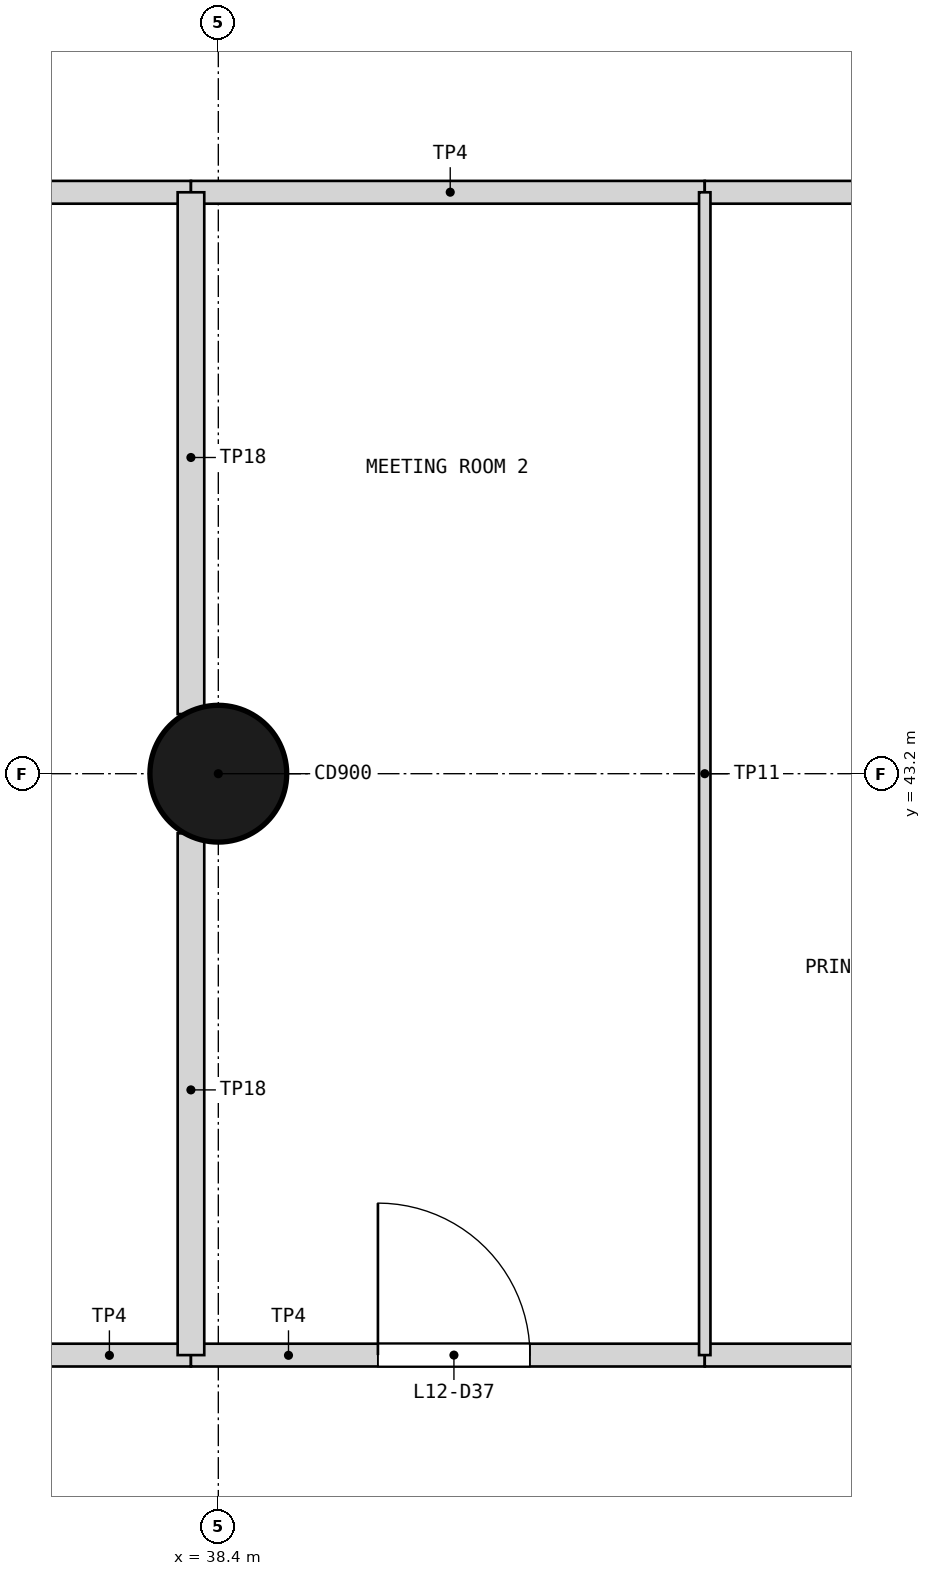
"""IFC4 building model, lengths in metres.
Left out: names, types, materials, properties, quantities, classifications, styles, units other than length and angle.
Written with IfcOpenShell. Run it as: python <this file> out.ifc"""

import sys

from ifc_helpers import new_model, si_unit, direction, frame, frame_2d, origin, origin_2d, place, context, subcontext, project, spatial, rectangle, circle, extrude, element, fill, save


model = new_model("IFC4")
c1 = context("Model", 3, precision=1e-05, world=origin(), true_north=direction((0.0, 1.0)))
c2 = subcontext(c1, "Body", "Model", "MODEL_VIEW")
j1 = project(units=[si_unit("LENGTHUNIT", "METRE"), si_unit("PLANEANGLEUNIT", "RADIAN")], contexts=[c1])
p1 = place(None, origin())
s1 = spatial("IfcSite", under=j1, at=p1, CompositionType="ELEMENT")
p2 = place(p1, origin())
s2 = spatial("IfcBuilding", under=s1, at=p2, CompositionType="ELEMENT")
p3 = place(p2, frame((0.0, 0.0, 48.3)))
s3 = spatial("IfcBuildingStorey", under=s2, at=p3, CompositionType="ELEMENT", Elevation=48.3)
p4 = place(p3, frame((38.4, 43.2, 0.0), z_axis=(0.0, 0.0, 1.0), x_axis=(1.0, 0.0, 0.0)))
e1 = element("IfcColumn", 1, at=p4, inside=s3, PredefinedType="COLUMN", context=c2, shape_type="SweptSolid", body=[
    extrude(circle(Radius=0.45, at=origin_2d()), origin(), (0.0, 0.0, 1.0), 3.9),
])
p5 = place(p3, frame((35.2, 39.375, 0.0), z_axis=(0.0, 0.0, 1.0), x_axis=(1.0, 0.0, 0.0)))
e2 = element("IfcWall", 2, at=p5, inside=s3, PredefinedType="PARTITIONING", context=c2, shape_type="SweptSolid", body=[
    extrude(rectangle(XDim=3.02, YDim=0.15, at=frame_2d((1.51, 0.0))), origin(), (0.0, 0.0, 1.0), 3.68),
])
p6 = place(p5, frame((1.0, 0.0, 0.0)))
e3 = element("IfcOpeningElement", 3, at=p6, cuts=e2, PredefinedType="OPENING", context=c2, shape_type="SweptSolid", body=[
    extrude(rectangle(XDim=1.0, YDim=2.1, at=frame_2d((0.5, 1.05))), frame((0.0, 0.085, 0.0), z_axis=(0.0, -1.0, 0.0), x_axis=(1.0, 0.0, 0.0)), (0.0, 0.0, 1.0), 0.17),
])
p7 = place(p3, frame((35.2, 47.025, 0.0), z_axis=(0.0, 0.0, 1.0), x_axis=(1.0, 0.0, 0.0)))
e4 = element("IfcWall", 4, at=p7, inside=s3, PredefinedType="PARTITIONING", context=c2, shape_type="SweptSolid", body=[
    extrude(rectangle(XDim=3.02, YDim=0.15, at=frame_2d((1.51, 0.0))), origin(), (0.0, 0.0, 1.0), 3.68),
])
p8 = place(p3, frame((38.22, 39.375, 0.0), z_axis=(0.0, 0.0, 1.0), x_axis=(1.0, 0.0, 0.0)))
e5 = element("IfcWall", 5, at=p8, inside=s3, PredefinedType="PARTITIONING", context=c2, shape_type="SweptSolid", body=[
    extrude(rectangle(XDim=3.38, YDim=0.15, at=frame_2d((1.69, 0.0))), origin(), (0.0, 0.0, 1.0), 3.68),
])
p9 = place(p8, frame((1.23, 0.0, 0.0)))
e6 = element("IfcOpeningElement", 6, at=p9, cuts=e5, PredefinedType="OPENING", context=c2, shape_type="SweptSolid", body=[
    extrude(rectangle(XDim=1.0, YDim=2.1, at=frame_2d((0.5, 1.05))), frame((0.0, 0.085, 0.0), z_axis=(0.0, -1.0, 0.0), x_axis=(1.0, 0.0, 0.0)), (0.0, 0.0, 1.0), 0.17),
])
p10 = place(p3, frame((38.22, 47.025, 0.0), z_axis=(0.0, 0.0, 1.0), x_axis=(1.0, 0.0, 0.0)))
e7 = element("IfcWall", 7, at=p10, inside=s3, PredefinedType="PARTITIONING", context=c2, shape_type="SweptSolid", body=[
    extrude(rectangle(XDim=3.38, YDim=0.15, at=frame_2d((1.69, 0.0))), origin(), (0.0, 0.0, 1.0), 3.68),
])
p11 = place(p3, frame((41.6, 39.375, 0.0), z_axis=(0.0, 0.0, 1.0), x_axis=(1.0, 0.0, 0.0)))
e8 = element("IfcWall", 8, at=p11, inside=s3, PredefinedType="PARTITIONING", context=c2, shape_type="SweptSolid", body=[
    extrude(rectangle(XDim=3.02, YDim=0.15, at=frame_2d((1.51, 0.0))), origin(), (0.0, 0.0, 1.0), 3.68),
])
p12 = place(p11, frame((1.0, 0.0, 0.0)))
e9 = element("IfcOpeningElement", 9, at=p12, cuts=e8, PredefinedType="OPENING", context=c2, shape_type="SweptSolid", body=[
    extrude(rectangle(XDim=1.0, YDim=2.1, at=frame_2d((0.5, 1.05))), frame((0.0, 0.085, 0.0), z_axis=(0.0, -1.0, 0.0), x_axis=(1.0, 0.0, 0.0)), (0.0, 0.0, 1.0), 0.17),
])
p13 = place(p3, frame((41.6, 47.025, 0.0), z_axis=(0.0, 0.0, 1.0), x_axis=(1.0, 0.0, 0.0)))
e10 = element("IfcWall", 10, at=p13, inside=s3, PredefinedType="PARTITIONING", context=c2, shape_type="SweptSolid", body=[
    extrude(rectangle(XDim=3.02, YDim=0.15, at=frame_2d((1.51, 0.0))), origin(), (0.0, 0.0, 1.0), 3.68),
])
for number, where, z_axis, x_axis in (
    (11, (38.22, 39.375, 0.0), (0.0, 0.0, 1.0), (0.0, 1.0, 0.0)),
    (12, (38.22, 43.592, 0.0), (0.0, 0.0, 1.0), (0.0, 1.0, 0.0)),
):
    element("IfcWall", number, at=place(p3, frame(where, z_axis=z_axis, x_axis=x_axis)), inside=s3, PredefinedType="PARTITIONING", context=c2, shape_type="SweptSolid", body=[
        extrude(rectangle(XDim=3.433, YDim=0.175, at=frame_2d((1.716, 0.0))), origin(), (0.0, 0.0, 1.0), 2.78),
    ])
p14 = place(p3, frame((41.6, 39.375, 0.0), z_axis=(0.0, 0.0, 1.0), x_axis=(0.0, 1.0, 0.0)))
e13 = element("IfcWall", 13, at=p14, inside=s3, PredefinedType="PARTITIONING", context=c2, shape_type="SweptSolid", body=[
    extrude(rectangle(XDim=7.65, YDim=0.075, at=frame_2d((3.825, 0.0))), origin(), (0.0, 0.0, 1.0), 3.08),
])
p15 = place(p9, origin())
e14 = element("IfcDoor", 14, at=p15, inside=s3, OperationType="SINGLE_SWING_LEFT", PredefinedType="DOOR", context=c2, shape_type="SweptSolid", body=[
    extrude(rectangle(XDim=1.0, YDim=2.1, at=frame_2d((0.5, 1.05))), frame((0.0, 0.025, 0.0), z_axis=(0.0, -1.0, 0.0), x_axis=(1.0, 0.0, 0.0)), (0.0, 0.0, 1.0), 0.05),
])
fill(e6, e14)
save(model, sys.argv[1])
